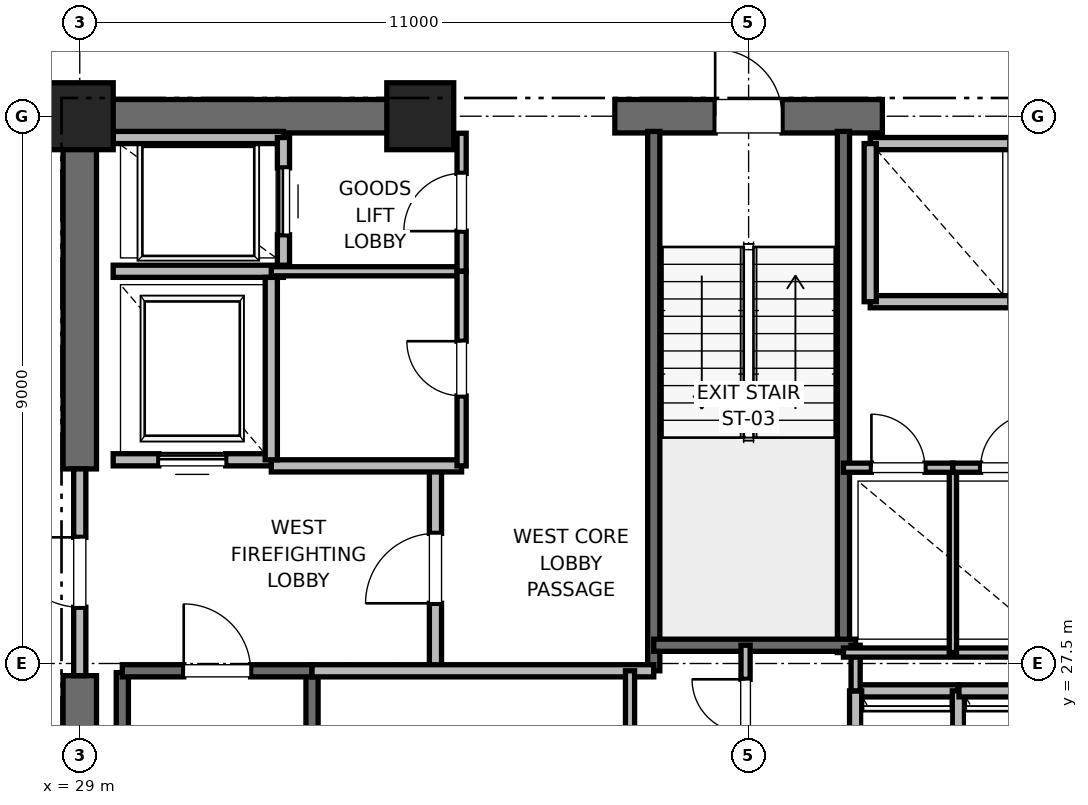
"""IFC4 building model, lengths in metres.
Left out: names, types, materials, properties, quantities, classifications, styles, units other than length and angle.
Written with IfcOpenShell. Run it as: python <this file> out.ifc"""

import sys

from ifc_helpers import new_model, si_unit, direction, frame, frame_2d, origin, origin_2d, place, context, subcontext, project, spatial, rectangle, extrude, element, fill, save


model = new_model("IFC4")
c1 = context("Model", 3, precision=1e-05, world=origin(), true_north=direction((0.0, 1.0)))
c2 = subcontext(c1, "Body", "Model", "MODEL_VIEW")
j1 = project(units=[si_unit("LENGTHUNIT", "METRE"), si_unit("PLANEANGLEUNIT", "RADIAN")], contexts=[c1])
p1 = place(None, origin())
s1 = spatial("IfcSite", under=j1, at=p1, CompositionType="ELEMENT")
p2 = place(p1, origin())
s2 = spatial("IfcBuilding", under=s1, at=p2, CompositionType="ELEMENT")
p3 = place(p2, frame((0.0, 0.0, 156.4)))
s3 = spatial("IfcBuildingStorey", under=s2, at=p3, CompositionType="ELEMENT", Elevation=156.4)
for number, where, z_axis, x_axis in (
    (1, (29.0, 36.5, 0.0), (0.0, 0.0, 1.0), (1.0, 0.0, 0.0)),
    (2, (34.6, 36.5, 0.0), (0.0, 0.0, 1.0), (1.0, 0.0, 0.0)),
):
    element("IfcColumn", number, at=place(p3, frame(where, z_axis=z_axis, x_axis=x_axis)), inside=s3, PredefinedType="PILASTER", context=c2, shape_type="SweptSolid", body=[
        extrude(rectangle(XDim=1.1, YDim=1.1, at=origin_2d()), origin(), (0.0, 0.0, 1.0), 4.0),
    ])
p4 = place(p3, frame((29.0, 36.5, 0.0), z_axis=(0.0, 0.0, 1.0), x_axis=(1.0, 0.0, 0.0)))
e3 = element("IfcWall", 3, at=p4, inside=s3, PredefinedType="SHEAR", context=c2, shape_type="SweptSolid", body=[
    extrude(rectangle(XDim=5.8, YDim=0.55, at=frame_2d((2.9, 0.0))), origin(), (0.0, 0.0, 1.0), 3.775),
])
p5 = place(p3, frame((37.8, 36.5, 0.0), z_axis=(0.0, 0.0, 1.0), x_axis=(1.0, 0.0, 0.0)))
e4 = element("IfcWall", 4, at=p5, inside=s3, PredefinedType="SHEAR", context=c2, shape_type="SweptSolid", body=[
    extrude(rectangle(XDim=4.4, YDim=0.55, at=frame_2d((2.2, 0.0))), origin(), (0.0, 0.0, 1.0), 3.775),
])
p6 = place(p5, frame((1.65, 0.0, 0.0)))
e5 = element("IfcOpeningElement", 5, at=p6, cuts=e4, PredefinedType="OPENING", context=c2, shape_type="SweptSolid", body=[
    extrude(rectangle(XDim=1.1, YDim=2.15, at=frame_2d((0.55, 1.075))), frame((0.0, 0.275, 0.0), z_axis=(0.0, -1.0, 0.0), x_axis=(1.0, 0.0, 0.0)), (0.0, 0.0, 1.0), 0.55),
])
p7 = place(p3, frame((29.0, 18.5, 0.0), z_axis=(0.0, 0.0, 1.0), x_axis=(0.0, 1.0, 0.0)))
e6 = element("IfcWall", 6, at=p7, inside=s3, PredefinedType="SHEAR", context=c2, shape_type="SweptSolid", body=[
    extrude(rectangle(XDim=8.8, YDim=0.55, at=frame_2d((4.4, 0.0))), origin(), (0.0, 0.0, 1.0), 3.775),
])
p8 = place(p3, frame((29.0, 30.7, 0.0), z_axis=(0.0, 0.0, 1.0), x_axis=(0.0, 1.0, 0.0)))
e7 = element("IfcWall", 7, at=p8, inside=s3, PredefinedType="SHEAR", context=c2, shape_type="SweptSolid", body=[
    extrude(rectangle(XDim=5.8, YDim=0.55, at=frame_2d((2.9, 0.0))), origin(), (0.0, 0.0, 1.0), 3.775),
])
p9 = place(p3, frame((29.7, 19.2, 0.0), z_axis=(0.0, 0.0, 1.0), x_axis=(0.0, 1.0, 0.0)))
e8 = element("IfcWall", 8, at=p9, inside=s3, PredefinedType="SOLIDWALL", context=c2, shape_type="SweptSolid", body=[
    extrude(rectangle(XDim=8.15, YDim=0.2, at=frame_2d((4.075, 0.0))), origin(), (0.0, 0.0, 1.0), 3.775),
])
p10 = place(p3, frame((32.82, 18.6, 0.0), z_axis=(0.0, 0.0, 1.0), x_axis=(0.0, 1.0, 0.0)))
e9 = element("IfcWall", 9, at=p10, inside=s3, PredefinedType="SOLIDWALL", context=c2, shape_type="SweptSolid", body=[
    extrude(rectangle(XDim=8.78, YDim=0.2, at=frame_2d((4.39, 0.0))), origin(), (0.0, 0.0, 1.0), 3.775),
])
p11 = place(p3, frame((29.7, 27.38, 0.0), z_axis=(0.0, 0.0, 1.0), x_axis=(1.0, 0.0, 0.0)))
e10 = element("IfcWall", 10, at=p11, inside=s3, PredefinedType="SOLIDWALL", context=c2, shape_type="SweptSolid", body=[
    extrude(rectangle(XDim=3.12, YDim=0.2, at=frame_2d((1.56, 0.0))), origin(), (0.0, 0.0, 1.0), 3.775),
])
p12 = place(p11, frame((1.01, 0.0, 0.0)))
e11 = element("IfcOpeningElement", 11, at=p12, cuts=e10, PredefinedType="OPENING", context=c2, shape_type="SweptSolid", body=[
    extrude(rectangle(XDim=1.1, YDim=2.15, at=frame_2d((0.55, 1.075))), frame((0.0, 0.1, 0.0), z_axis=(0.0, -1.0, 0.0), x_axis=(1.0, 0.0, 0.0)), (0.0, 0.0, 1.0), 0.2),
])
p13 = place(p3, frame((38.44, 27.38, 0.0), z_axis=(0.0, 0.0, 1.0), x_axis=(0.0, 1.0, 0.0)))
e12 = element("IfcWall", 12, at=p13, inside=s3, PredefinedType="SOLIDWALL", context=c2, shape_type="SweptSolid", body=[
    extrude(rectangle(XDim=8.87, YDim=0.2, at=frame_2d((4.435, 0.0))), origin(), (0.0, 0.0, 1.0), 3.775),
])
p14 = place(p3, frame((41.56, 27.68, 0.0), z_axis=(0.0, 0.0, 1.0), x_axis=(0.0, 1.0, 0.0)))
e13 = element("IfcWall", 13, at=p14, inside=s3, PredefinedType="SOLIDWALL", context=c2, shape_type="SweptSolid", body=[
    extrude(rectangle(XDim=8.57, YDim=0.2, at=frame_2d((4.285, 0.0))), origin(), (0.0, 0.0, 1.0), 3.775),
])
p15 = place(p3, frame((38.44, 27.8, 0.0), z_axis=(0.0, 0.0, 1.0), x_axis=(1.0, 0.0, 0.0)))
e14 = element("IfcWall", 14, at=p15, inside=s3, PredefinedType="SOLIDWALL", context=c2, shape_type="SweptSolid", body=[
    extrude(rectangle(XDim=3.32, YDim=0.2, at=frame_2d((1.66, 0.0))), origin(), (0.0, 0.0, 1.0), 3.775),
])
p16 = place(p3, frame((34.85, 27.38, 0.0), z_axis=(0.0, 0.0, 1.0), x_axis=(0.0, 1.0, 0.0)))
e15 = element("IfcWall", 15, at=p16, inside=s3, PredefinedType="PARTITIONING", context=c2, shape_type="SweptSolid", body=[
    extrude(rectangle(XDim=3.37, YDim=0.2, at=frame_2d((1.685, 0.0))), origin(), (0.0, 0.0, 1.0), 3.775),
])
p17 = place(p16, frame((1.11, 0.0, 0.0)))
e16 = element("IfcOpeningElement", 16, at=p17, cuts=e15, PredefinedType="OPENING", context=c2, shape_type="SweptSolid", body=[
    extrude(rectangle(XDim=1.15, YDim=2.2, at=frame_2d((0.575, 1.1))), frame((0.0, 0.1, 0.0), z_axis=(0.0, -1.0, 0.0), x_axis=(1.0, 0.0, 0.0)), (0.0, 0.0, 1.0), 0.2),
])
p18 = place(p3, frame((29.0, 27.3, 0.0), z_axis=(0.0, 0.0, 1.0), x_axis=(0.0, 1.0, 0.0)))
e17 = element("IfcWall", 17, at=p18, inside=s3, PredefinedType="PARTITIONING", context=c2, shape_type="SweptSolid", body=[
    extrude(rectangle(XDim=3.4, YDim=0.2, at=frame_2d((1.7, 0.0))), origin(), (0.0, 0.0, 1.0), 2.755),
])
p19 = place(p18, frame((1.125, 0.0, 0.0)))
e18 = element("IfcOpeningElement", 18, at=p19, cuts=e17, PredefinedType="OPENING", context=c2, shape_type="SweptSolid", body=[
    extrude(rectangle(XDim=1.15, YDim=2.2, at=frame_2d((0.575, 1.1))), frame((0.0, 0.1, 0.0), z_axis=(0.0, -1.0, 0.0), x_axis=(1.0, 0.0, 0.0)), (0.0, 0.0, 1.0), 0.2),
])
p20 = place(p3, frame((32.82, 27.38, 0.0), z_axis=(0.0, 0.0, 1.0), x_axis=(1.0, 0.0, 0.0)))
e19 = element("IfcWall", 19, at=p20, inside=s3, PredefinedType="PARTITIONING", context=c2, shape_type="SweptSolid", body=[
    extrude(rectangle(XDim=5.62, YDim=0.2, at=frame_2d((2.81, 0.0))), origin(), (0.0, 0.0, 1.0), 3.775),
])
p21 = place(p3, frame((32.15, 30.75, 0.0), z_axis=(0.0, 0.0, 1.0), x_axis=(1.0, 0.0, 0.0)))
e20 = element("IfcWall", 20, at=p21, inside=s3, PredefinedType="PARTITIONING", context=c2, shape_type="SweptSolid", body=[
    extrude(rectangle(XDim=3.13, YDim=0.2, at=frame_2d((1.565, 0.0))), origin(), (0.0, 0.0, 1.0), 3.775),
])
p22 = place(p3, frame((29.55, 30.85, 0.0), z_axis=(0.0, 0.0, 1.0), x_axis=(1.0, 0.0, 0.0)))
e21 = element("IfcWall", 21, at=p22, inside=s3, PredefinedType="SOLIDWALL", context=c2, shape_type="SweptSolid", body=[
    extrude(rectangle(XDim=2.6, YDim=0.2, at=frame_2d((1.3, 0.0))), origin(), (0.0, 0.0, 1.0), 2.755),
])
p23 = place(p22, frame((0.75, 0.0, 0.0)))
e22 = element("IfcOpeningElement", 22, at=p23, cuts=e21, PredefinedType="OPENING", context=c2, shape_type="SweptSolid", body=[
    extrude(rectangle(XDim=1.1, YDim=2.2, at=frame_2d((0.55, 1.1))), frame((0.0, 0.1, 0.0), z_axis=(0.0, -1.0, 0.0), x_axis=(1.0, 0.0, 0.0)), (0.0, 0.0, 1.0), 0.2),
])
p24 = place(p3, frame((29.55, 33.95, 0.0), z_axis=(0.0, 0.0, 1.0), x_axis=(1.0, 0.0, 0.0)))
e23 = element("IfcWall", 23, at=p24, inside=s3, PredefinedType="SOLIDWALL", context=c2, shape_type="SweptSolid", body=[
    extrude(rectangle(XDim=2.8, YDim=0.2, at=frame_2d((1.4, 0.0))), origin(), (0.0, 0.0, 1.0), 3.775),
])
p25 = place(p3, frame((32.15, 30.85, 0.0), z_axis=(0.0, 0.0, 1.0), x_axis=(0.0, 1.0, 0.0)))
e24 = element("IfcWall", 24, at=p25, inside=s3, PredefinedType="SOLIDWALL", context=c2, shape_type="SweptSolid", body=[
    extrude(rectangle(XDim=3.0, YDim=0.2, at=frame_2d((1.5, 0.0))), origin(), (0.0, 0.0, 1.0), 3.775),
])
p26 = place(p3, frame((32.35, 36.15, 0.0), z_axis=(0.0, 0.0, 1.0), x_axis=(-1.0, 0.0, 0.0)))
e25 = element("IfcWall", 25, at=p26, inside=s3, PredefinedType="SOLIDWALL", context=c2, shape_type="SweptSolid", body=[
    extrude(rectangle(XDim=2.8, YDim=0.2, at=frame_2d((1.4, 0.0))), origin(), (0.0, 0.0, 1.0), 2.985),
])
p27 = place(p3, frame((32.35, 34.05, 0.0), z_axis=(0.0, 0.0, 1.0), x_axis=(0.0, 1.0, 0.0)))
e26 = element("IfcWall", 26, at=p27, inside=s3, PredefinedType="SOLIDWALL", context=c2, shape_type="SweptSolid", body=[
    extrude(rectangle(XDim=2.1, YDim=0.2, at=frame_2d((1.05, 0.0))), origin(), (0.0, 0.0, 1.0), 3.775),
])
p28 = place(p27, frame((0.5, 0.0, 0.0)))
e27 = element("IfcOpeningElement", 27, at=p28, cuts=e26, PredefinedType="OPENING", context=c2, shape_type="SweptSolid", body=[
    extrude(rectangle(XDim=1.1, YDim=2.2, at=frame_2d((0.55, 1.1))), frame((0.0, 0.1, 0.0), z_axis=(0.0, -1.0, 0.0), x_axis=(1.0, 0.0, 0.0)), (0.0, 0.0, 1.0), 0.2),
])
p29 = place(p3, frame((43.44, 27.05, 0.0), z_axis=(0.0, 0.0, 1.0), x_axis=(-1.0, 0.0, 0.0)))
e28 = element("IfcWall", 28, at=p29, inside=s3, PredefinedType="SOLIDWALL", context=c2, shape_type="SweptSolid", body=[
    extrude(rectangle(XDim=1.68, YDim=0.2, at=frame_2d((0.84, 0.0))), origin(), (0.0, 0.0, 1.0), 3.775),
])
for number, where, z_axis, x_axis in (
    (29, (41.76, 27.05, 0.0), (0.0, 0.0, 1.0), (0.0, -1.0, 0.0)),
    (30, (43.45, 24.45, 0.0), (0.0, 0.0, 1.0), (0.0, 1.0, 0.0)),
):
    element("IfcWall", number, at=place(p3, frame(where, z_axis=z_axis, x_axis=x_axis)), inside=s3, PredefinedType="SOLIDWALL", context=c2, shape_type="SweptSolid", body=[
        extrude(rectangle(XDim=2.6, YDim=0.2, at=frame_2d((1.3, 0.0))), origin(), (0.0, 0.0, 1.0), 3.775),
    ])
p30 = place(p3, frame((45.12, 27.05, 0.0), z_axis=(0.0, 0.0, 1.0), x_axis=(-1.0, 0.0, 0.0)))
e31 = element("IfcWall", 31, at=p30, inside=s3, PredefinedType="SOLIDWALL", context=c2, shape_type="SweptSolid", body=[
    extrude(rectangle(XDim=1.66, YDim=0.2, at=frame_2d((0.83, 0.0))), origin(), (0.0, 0.0, 1.0), 3.775),
])
p31 = place(p3, frame((42.0, 33.45, 0.0), z_axis=(0.0, 0.0, 1.0), x_axis=(1.0, 0.0, 0.0)))
e32 = element("IfcWall", 32, at=p31, inside=s3, PredefinedType="SOLIDWALL", context=c2, shape_type="SweptSolid", body=[
    extrude(rectangle(XDim=2.3, YDim=0.2, at=frame_2d((1.15, 0.0))), origin(), (0.0, 0.0, 1.0), 3.775),
])
p32 = place(p3, frame((44.3, 36.05, 0.0), z_axis=(0.0, 0.0, 1.0), x_axis=(-1.0, 0.0, 0.0)))
e33 = element("IfcWall", 33, at=p32, inside=s3, PredefinedType="SOLIDWALL", context=c2, shape_type="SweptSolid", body=[
    extrude(rectangle(XDim=2.3, YDim=0.2, at=frame_2d((1.15, 0.0))), origin(), (0.0, 0.0, 1.0), 2.755),
])
p33 = place(p3, frame((42.0, 36.05, 0.0), z_axis=(0.0, 0.0, 1.0), x_axis=(0.0, -1.0, 0.0)))
e34 = element("IfcWall", 34, at=p33, inside=s3, PredefinedType="SOLIDWALL", context=c2, shape_type="SweptSolid", body=[
    extrude(rectangle(XDim=2.6, YDim=0.2, at=frame_2d((1.3, 0.0))), origin(), (0.0, 0.0, 1.0), 2.755),
])
p34 = place(p3, frame((41.76, 27.05, 0.0), z_axis=(0.0, 0.0, 1.0), x_axis=(0.0, 1.0, 0.0)))
e35 = element("IfcWall", 35, at=p34, inside=s3, PredefinedType="PARTITIONING", context=c2, shape_type="SweptSolid", body=[
    extrude(rectangle(XDim=0.75, YDim=0.15, at=frame_2d((0.375, 0.0))), origin(), (0.0, 0.0, 1.0), 2.85),
])
p35 = place(p3, frame((39.95, 25.8, 0.0), z_axis=(0.0, 0.0, 1.0), x_axis=(0.0, 1.0, 0.0)))
e36 = element("IfcWall", 36, at=p35, inside=s3, PredefinedType="PARTITIONING", context=c2, shape_type="SweptSolid", body=[
    extrude(rectangle(XDim=2.0, YDim=0.15, at=frame_2d((1.0, 0.0))), origin(), (0.0, 0.0, 1.0), 2.85),
])
p36 = place(p35, frame((0.56, 0.0, 0.0)))
e37 = element("IfcOpeningElement", 37, at=p36, cuts=e36, PredefinedType="OPENING", context=c2, shape_type="SweptSolid", body=[
    extrude(rectangle(XDim=0.88, YDim=2.1, at=frame_2d((0.44, 1.05))), frame((0.0, 0.075, 0.0), z_axis=(0.0, -1.0, 0.0), x_axis=(1.0, 0.0, 0.0)), (0.0, 0.0, 1.0), 0.15),
])
p37 = place(p3, frame((32.15, 33.95, 0.0), z_axis=(0.0, 0.0, 1.0), x_axis=(1.0, 0.0, 0.0)))
e38 = element("IfcWall", 38, at=p37, inside=s3, PredefinedType="PARTITIONING", context=c2, shape_type="SweptSolid", body=[
    extrude(rectangle(XDim=3.13, YDim=0.15, at=frame_2d((1.565, 0.0))), origin(), (0.0, 0.0, 1.0), 2.85),
])
p38 = place(p3, frame((35.28, 33.95, 0.0), z_axis=(0.0, 0.0, 1.0), x_axis=(0.0, 1.0, 0.0)))
e39 = element("IfcWall", 39, at=p38, inside=s3, PredefinedType="PARTITIONING", context=c2, shape_type="SweptSolid", body=[
    extrude(rectangle(XDim=2.27, YDim=0.15, at=frame_2d((1.135, 0.0))), origin(), (0.0, 0.0, 1.0), 2.755),
])
p39 = place(p38, frame((0.66, 0.0, 0.0)))
e40 = element("IfcOpeningElement", 40, at=p39, cuts=e39, PredefinedType="OPENING", context=c2, shape_type="SweptSolid", body=[
    extrude(rectangle(XDim=0.95, YDim=2.15, at=frame_2d((0.475, 1.075))), frame((0.0, 0.075, 0.0), z_axis=(0.0, -1.0, 0.0), x_axis=(1.0, 0.0, 0.0)), (0.0, 0.0, 1.0), 0.15),
])
p40 = place(p3, frame((35.28, 30.75, 0.0), z_axis=(0.0, 0.0, 1.0), x_axis=(0.0, 1.0, 0.0)))
e41 = element("IfcWall", 41, at=p40, inside=s3, PredefinedType="PARTITIONING", context=c2, shape_type="SweptSolid", body=[
    extrude(rectangle(XDim=3.2, YDim=0.15, at=frame_2d((1.6, 0.0))), origin(), (0.0, 0.0, 1.0), 2.85),
])
p41 = place(p40, frame((1.15, 0.0, 0.0)))
e42 = element("IfcOpeningElement", 42, at=p41, cuts=e41, PredefinedType="OPENING", context=c2, shape_type="SweptSolid", body=[
    extrude(rectangle(XDim=0.9, YDim=2.1, at=frame_2d((0.45, 1.05))), frame((0.0, 0.075, 0.0), z_axis=(0.0, -1.0, 0.0), x_axis=(1.0, 0.0, 0.0)), (0.0, 0.0, 1.0), 0.15),
])
p42 = place(p3, frame((38.05, 23.06, 0.0), z_axis=(0.0, 0.0, 1.0), x_axis=(0.0, 1.0, 0.0)))
e43 = element("IfcWall", 43, at=p42, inside=s3, PredefinedType="PARTITIONING", context=c2, shape_type="SweptSolid", body=[
    extrude(rectangle(XDim=4.32, YDim=0.15, at=frame_2d((2.16, 0.0))), origin(), (0.0, 0.0, 1.0), 2.85),
])
p43 = place(p42, frame((1.66, 0.0, 0.0)))
e44 = element("IfcOpeningElement", 44, at=p43, cuts=e43, PredefinedType="OPENING", context=c2, shape_type="SweptSolid", body=[
    extrude(rectangle(XDim=1.0, YDim=2.15, at=frame_2d((0.5, 1.075))), frame((0.0, 0.075, 0.0), z_axis=(0.0, -1.0, 0.0), x_axis=(1.0, 0.0, 0.0)), (0.0, 0.0, 1.0), 0.15),
])
p44 = place(p3, frame((41.56, 27.68, 0.0), z_axis=(0.0, 0.0, 1.0), x_axis=(1.0, 0.0, 0.0)))
e45 = element("IfcWall", 45, at=p44, inside=s3, PredefinedType="PARTITIONING", context=c2, shape_type="SweptSolid", body=[
    extrude(rectangle(XDim=3.59, YDim=0.15, at=frame_2d((1.795, 0.0))), origin(), (0.0, 0.0, 1.0), 2.85),
])
p45 = place(p3, frame((43.36, 27.68, 0.0), z_axis=(0.0, 0.0, 1.0), x_axis=(0.0, 1.0, 0.0)))
e46 = element("IfcWall", 46, at=p45, inside=s3, PredefinedType="PARTITIONING", context=c2, shape_type="SweptSolid", body=[
    extrude(rectangle(XDim=3.04, YDim=0.12, at=frame_2d((1.52, 0.0))), origin(), (0.0, 0.0, 1.0), 2.85),
])
p46 = place(p3, frame((41.56, 30.72, 0.0), z_axis=(0.0, 0.0, 1.0), x_axis=(1.0, 0.0, 0.0)))
e47 = element("IfcWall", 47, at=p46, inside=s3, PredefinedType="PARTITIONING", context=c2, shape_type="SweptSolid", body=[
    extrude(rectangle(XDim=1.8, YDim=0.15, at=frame_2d((0.9, 0.0))), origin(), (0.0, 0.0, 1.0), 2.85),
])
p47 = place(p46, frame((0.46, 0.0, 0.0)))
e48 = element("IfcOpeningElement", 48, at=p47, cuts=e47, PredefinedType="OPENING", context=c2, shape_type="SweptSolid", body=[
    extrude(rectangle(XDim=0.88, YDim=2.1, at=frame_2d((0.44, 1.05))), frame((0.0, 0.075, 0.0), z_axis=(0.0, -1.0, 0.0), x_axis=(1.0, 0.0, 0.0)), (0.0, 0.0, 1.0), 0.15),
])
p48 = place(p3, frame((43.36, 30.72, 0.0), z_axis=(0.0, 0.0, 1.0), x_axis=(1.0, 0.0, 0.0)))
e49 = element("IfcWall", 49, at=p48, inside=s3, PredefinedType="PARTITIONING", context=c2, shape_type="SweptSolid", body=[
    extrude(rectangle(XDim=1.79, YDim=0.15, at=frame_2d((0.895, 0.0))), origin(), (0.0, 0.0, 1.0), 2.85),
])
p49 = place(p48, frame((0.455, 0.0, 0.0)))
e50 = element("IfcOpeningElement", 50, at=p49, cuts=e49, PredefinedType="OPENING", context=c2, shape_type="SweptSolid", body=[
    extrude(rectangle(XDim=0.88, YDim=2.1, at=frame_2d((0.44, 1.05))), frame((0.0, 0.075, 0.0), z_axis=(0.0, -1.0, 0.0), x_axis=(1.0, 0.0, 0.0)), (0.0, 0.0, 1.0), 0.15),
])
p50 = place(p12, origin())
e51 = element("IfcDoor", 51, at=p50, inside=s3, OperationType="SINGLE_SWING_LEFT", PredefinedType="DOOR", context=c2, shape_type="SweptSolid", body=[
    extrude(rectangle(XDim=1.1, YDim=2.15, at=frame_2d((0.55, 1.075))), frame((0.0, 0.025, 0.0), z_axis=(0.0, -1.0, 0.0), x_axis=(1.0, 0.0, 0.0)), (0.0, 0.0, 1.0), 0.05),
])
fill(e11, e51)
p51 = place(p6, origin())
e52 = element("IfcDoor", 52, at=p51, inside=s3, OperationType="SINGLE_SWING_LEFT", PredefinedType="DOOR", context=c2, shape_type="SweptSolid", body=[
    extrude(rectangle(XDim=1.1, YDim=2.15, at=frame_2d((0.55, 1.075))), frame((0.0, 0.025, 0.0), z_axis=(0.0, -1.0, 0.0), x_axis=(1.0, 0.0, 0.0)), (0.0, 0.0, 1.0), 0.05),
])
fill(e5, e52)
p52 = place(p17, origin())
e53 = element("IfcDoor", 53, at=p52, inside=s3, OperationType="SINGLE_SWING_LEFT", PredefinedType="DOOR", context=c2, shape_type="SweptSolid", body=[
    extrude(rectangle(XDim=1.15, YDim=2.2, at=frame_2d((0.575, 1.1))), frame((0.0, 0.025, 0.0), z_axis=(0.0, -1.0, 0.0), x_axis=(1.0, 0.0, 0.0)), (0.0, 0.0, 1.0), 0.05),
])
fill(e16, e53)
p53 = place(p19, origin())
e54 = element("IfcDoor", 54, at=p53, inside=s3, OperationType="SINGLE_SWING_RIGHT", PredefinedType="DOOR", context=c2, shape_type="SweptSolid", body=[
    extrude(rectangle(XDim=1.15, YDim=2.2, at=frame_2d((0.575, 1.1))), frame((0.0, 0.025, 0.0), z_axis=(0.0, -1.0, 0.0), x_axis=(1.0, 0.0, 0.0)), (0.0, 0.0, 1.0), 0.05),
])
fill(e18, e54)
p54 = place(p23, origin())
e55 = element("IfcDoor", 55, at=p54, inside=s3, OperationType="SLIDING_TO_RIGHT", PredefinedType="DOOR", context=c2, shape_type="SweptSolid", body=[
    extrude(rectangle(XDim=1.1, YDim=2.2, at=frame_2d((0.55, 1.1))), frame((0.0, 0.025, 0.0), z_axis=(0.0, -1.0, 0.0), x_axis=(1.0, 0.0, 0.0)), (0.0, 0.0, 1.0), 0.05),
])
fill(e22, e55)
p55 = place(p28, origin())
e56 = element("IfcDoor", 56, at=p55, inside=s3, OperationType="SLIDING_TO_RIGHT", PredefinedType="DOOR", context=c2, shape_type="SweptSolid", body=[
    extrude(rectangle(XDim=1.1, YDim=2.2, at=frame_2d((0.55, 1.1))), frame((0.0, 0.025, 0.0), z_axis=(0.0, -1.0, 0.0), x_axis=(1.0, 0.0, 0.0)), (0.0, 0.0, 1.0), 0.05),
])
fill(e27, e56)
p56 = place(p36, origin())
e57 = element("IfcDoor", 57, at=p56, inside=s3, OperationType="SINGLE_SWING_RIGHT", PredefinedType="DOOR", context=c2, shape_type="SweptSolid", body=[
    extrude(rectangle(XDim=0.88, YDim=2.1, at=frame_2d((0.44, 1.05))), frame((0.0, 0.025, 0.0), z_axis=(0.0, -1.0, 0.0), x_axis=(1.0, 0.0, 0.0)), (0.0, 0.0, 1.0), 0.05),
])
fill(e37, e57)
p57 = place(p39, origin())
e58 = element("IfcDoor", 58, at=p57, inside=s3, OperationType="SINGLE_SWING_LEFT", PredefinedType="DOOR", context=c2, shape_type="SweptSolid", body=[
    extrude(rectangle(XDim=0.95, YDim=2.15, at=frame_2d((0.475, 1.075))), frame((0.0, 0.025, 0.0), z_axis=(0.0, -1.0, 0.0), x_axis=(1.0, 0.0, 0.0)), (0.0, 0.0, 1.0), 0.05),
])
fill(e40, e58)
p58 = place(p41, origin())
e59 = element("IfcDoor", 59, at=p58, inside=s3, OperationType="SINGLE_SWING_RIGHT", PredefinedType="DOOR", context=c2, shape_type="SweptSolid", body=[
    extrude(rectangle(XDim=0.9, YDim=2.1, at=frame_2d((0.45, 1.05))), frame((0.0, 0.025, 0.0), z_axis=(0.0, -1.0, 0.0), x_axis=(1.0, 0.0, 0.0)), (0.0, 0.0, 1.0), 0.05),
])
fill(e42, e59)
p59 = place(p47, origin())
e60 = element("IfcDoor", 60, at=p59, inside=s3, OperationType="SINGLE_SWING_LEFT", PredefinedType="DOOR", context=c2, shape_type="SweptSolid", body=[
    extrude(rectangle(XDim=0.88, YDim=2.1, at=frame_2d((0.44, 1.05))), frame((0.0, 0.025, 0.0), z_axis=(0.0, -1.0, 0.0), x_axis=(1.0, 0.0, 0.0)), (0.0, 0.0, 1.0), 0.05),
])
fill(e48, e60)
p60 = place(p49, origin())
e61 = element("IfcDoor", 61, at=p60, inside=s3, OperationType="SINGLE_SWING_RIGHT", PredefinedType="DOOR", context=c2, shape_type="SweptSolid", body=[
    extrude(rectangle(XDim=0.88, YDim=2.1, at=frame_2d((0.44, 1.05))), frame((0.0, 0.025, 0.0), z_axis=(0.0, -1.0, 0.0), x_axis=(1.0, 0.0, 0.0)), (0.0, 0.0, 1.0), 0.05),
])
fill(e50, e61)
save(model, sys.argv[1])
